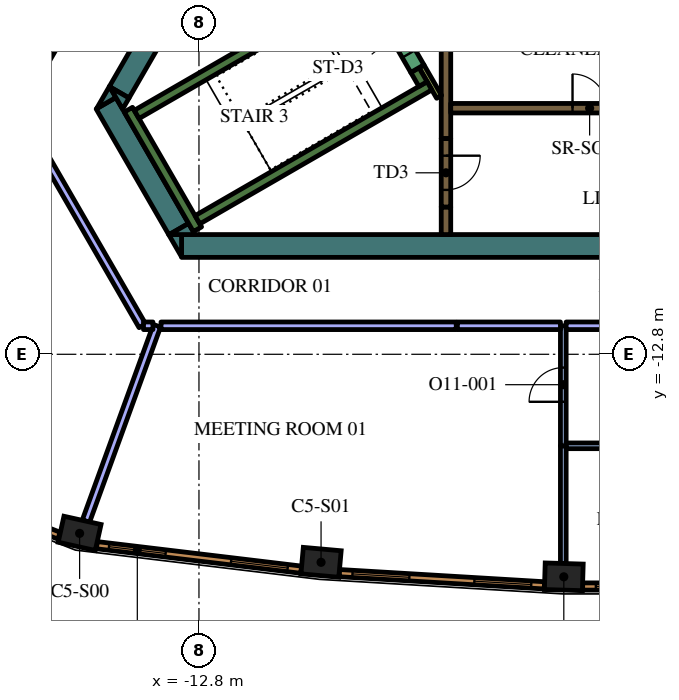
"""IFC4 building model, lengths in metres.
Left out: names, types, materials, properties, quantities, classifications, styles, units other than length and angle.
Written with IfcOpenShell. Run it as: python <this file> out.ifc"""

import sys

from ifc_helpers import new_model, si_unit, direction, frame, frame_2d, origin, origin_2d, place, context, subcontext, project, spatial, polyline, rectangle, outline, extrude, element, fill, save


model = new_model("IFC4")
c1 = context("Model", 3, precision=1e-05, world=origin(), true_north=direction((0.0, 1.0)))
c2 = subcontext(c1, "Body", "Model", "MODEL_VIEW")
j1 = project(units=[si_unit("LENGTHUNIT", "METRE"), si_unit("PLANEANGLEUNIT", "RADIAN")], contexts=[c1])
p1 = place(None, origin())
s1 = spatial("IfcSite", under=j1, at=p1, CompositionType="ELEMENT")
p2 = place(p1, origin())
s2 = spatial("IfcBuilding", under=s1, at=p2, CompositionType="ELEMENT")
p3 = place(p2, frame((0.0, 0.0, 271.2)))
s3 = spatial("IfcBuildingStorey", under=s2, at=p3, CompositionType="ELEMENT", Elevation=271.2)
for number, where, z_axis, x_axis in (
    (1, (-15.941, -17.512, 0.0), (0.0, 0.0, 1.0), (0.976, -0.217, 0.0)),
    (2, (-9.587, -18.274, 0.0), (0.0, 0.0, 1.0), (0.996, -0.089, 0.0)),
    (3, (-3.199, -18.655, 0.0), (0.0, 0.0, 1.0), (1.0, -0.03, 0.0)),
):
    element("IfcColumn", number, at=place(p3, frame(where, z_axis=z_axis, x_axis=x_axis)), inside=s3, PredefinedType="COLUMN", context=c2, shape_type="SweptSolid", body=[
        extrude(rectangle(XDim=1.0, YDim=0.7, at=origin_2d()), origin(), (0.0, 0.0, 1.0), 4.2),
    ])
p4 = place(p3, frame((8.904, -9.95, 0.0), z_axis=(0.0, 0.0, 1.0), x_axis=(-1.0, 0.0, 0.0)))
e4 = element("IfcWall", 4, at=p4, inside=s3, PredefinedType="SOLIDWALL", context=c2, shape_type="SweptSolid", body=[
    extrude(rectangle(XDim=22.161, YDim=0.6, at=frame_2d((11.081, 0.0))), origin(), (0.0, 0.0, 1.0), 4.2),
])
p5 = place(p3, origin())
e5 = element("IfcWall", 5, at=p5, inside=s3, PredefinedType="SOLIDWALL", context=c2, shape_type="SweptSolid", body=[
    extrude(outline(polyline([(-13.597, -9.65), (-13.259, -9.65), (-13.259, -10.236), (-13.597, -9.65)])), origin(), (0.0, 0.0, 1.0), 4.2),
])
p6 = place(p3, frame((-13.333, -9.506, 0.0), z_axis=(0.0, 0.0, 1.0), x_axis=(-0.500019073792, 0.866014391245, 0.0)))
e6 = element("IfcWall", 6, at=p6, inside=s3, PredefinedType="SOLIDWALL", context=c2, shape_type="SweptSolid", body=[
    extrude(rectangle(XDim=3.823, YDim=0.6, at=frame_2d((1.912, 0.0))), origin(), (0.0, 0.0, 1.0), 4.2),
])
e7 = element("IfcWall", 7, at=p5, inside=s3, PredefinedType="SOLIDWALL", context=c2, shape_type="SweptSolid", body=[
    extrude(outline(polyline([(-14.987, -6.043), (-15.493, -6.335), (-15.156, -5.75), (-14.987, -6.043)])), origin(), (0.0, 0.0, 1.0), 4.2),
])
e8 = element("IfcWall", 8, at=p5, inside=s3, PredefinedType="SOLIDWALL", context=c2, shape_type="SweptSolid", body=[
    extrude(outline(polyline([(-12.904, -9.65), (-13.58, -9.65), (-13.073, -9.357), (-12.904, -9.65)])), origin(), (0.0, 0.0, 1.0), 4.2),
])
p7 = place(p3, frame((-13.432, -3.364, 0.0), z_axis=(0.0, 0.0, 1.0), x_axis=(-0.499960127962, -0.866048422692, 0.0)))
e9 = element("IfcWall", 9, at=p7, inside=s3, PredefinedType="SOLIDWALL", context=c2, shape_type="SweptSolid", body=[
    extrude(rectangle(XDim=2.934, YDim=0.6, at=frame_2d((1.467, 0.0))), origin(), (0.0, 0.0, 1.0), 4.2),
])
e10 = element("IfcWall", 10, at=p5, inside=s3, PredefinedType="SOLIDWALL", context=c2, shape_type="SweptSolid", body=[
    extrude(outline(polyline([(-14.809, -6.35), (-15.147, -5.764), (-14.64, -6.057), (-14.809, -6.35)])), origin(), (0.0, 0.0, 1.0), 4.2),
])
p8 = place(p3, frame((-12.84, -9.511, 0.0), z_axis=(0.0, 0.0, 1.0), x_axis=(-0.499997733992, 0.866026712061, 0.0)))
e11 = element("IfcWall", 11, at=p8, inside=s3, PredefinedType="SOLIDWALL", context=c2, shape_type="SweptSolid", body=[
    extrude(rectangle(XDim=3.634, YDim=0.25, at=frame_2d((1.817, 0.0))), origin(), (0.0, 0.0, 1.0), 4.2),
])
p9 = place(p3, frame((-14.44, -6.49, 0.0), z_axis=(0.0, 0.0, 1.0), x_axis=(0.866022966069, 0.500004222222, 0.0)))
e12 = element("IfcWall", 12, at=p9, inside=s3, PredefinedType="SOLIDWALL", context=c2, shape_type="SweptSolid", body=[
    extrude(rectangle(XDim=6.8, YDim=0.25, at=frame_2d((3.4, 0.0))), origin(), (0.0, 0.0, 1.0), 4.2),
])
p10 = place(p3, frame((-12.84, -9.261, 0.0), z_axis=(0.0, 0.0, 1.0), x_axis=(0.866016039709, 0.500016218704, 0.0)))
e13 = element("IfcWall", 13, at=p10, inside=s3, PredefinedType="SOLIDWALL", context=c2, shape_type="SweptSolid", body=[
    extrude(rectangle(XDim=7.05, YDim=0.25, at=frame_2d((3.525, 0.0))), origin(), (0.0, 0.0, 1.0), 4.2),
])
p11 = place(p3, frame((-6.905, -5.69, 0.0), z_axis=(0.0, 0.0, 1.0), x_axis=(-0.500402024738, 0.865793170242, 0.0)))
e14 = element("IfcWall", 14, at=p11, inside=s3, PredefinedType="SOLIDWALL", context=c2, shape_type="SweptSolid", body=[
    extrude(rectangle(XDim=0.425, YDim=0.25, at=frame_2d((0.212, 0.0))), origin(), (0.0, 0.0, 1.0), 4.2),
])
p12 = place(p3, frame((-6.3, -7.125, 0.0), z_axis=(0.0, 0.0, 1.0), x_axis=(0.0, 1.0, 0.0)))
e15 = element("IfcWall", 15, at=p12, inside=s3, PredefinedType="SOLIDWALL", context=c2, shape_type="SweptSolid", body=[
    extrude(rectangle(XDim=3.375, YDim=0.25, at=frame_2d((1.687, 0.0))), origin(), (0.0, 0.0, 1.0), 4.2),
])
p13 = place(p3, frame((-6.3, -8.925, 0.0), z_axis=(0.0, 0.0, 1.0), x_axis=(0.0, -1.0, 0.0)))
e16 = element("IfcWall", 16, at=p13, inside=s3, PredefinedType="SOLIDWALL", context=c2, shape_type="SweptSolid", body=[
    extrude(rectangle(XDim=0.725, YDim=0.25, at=frame_2d((0.363, 0.0))), origin(), (0.0, 0.0, 1.0), 4.2),
])
p14 = place(p3, frame((-6.48, -6.027, 0.0), z_axis=(0.0, 0.0, 1.0), x_axis=(-0.499927229454, 0.866067413802, 0.0)))
e17 = element("IfcWall", 17, at=p14, inside=s3, PredefinedType="PARTITIONING", context=c2, shape_type="SweptSolid", body=[
    extrude(rectangle(XDim=0.929, YDim=0.15, at=frame_2d((0.464, 0.0))), origin(), (0.0, 0.0, 1.0), 4.2),
])
p15 = place(p3, frame((-6.175, -6.325, 0.0), z_axis=(0.0, 0.0, 1.0), x_axis=(1.0, 0.0, 0.0)))
e18 = element("IfcWall", 18, at=p15, inside=s3, PredefinedType="SOLIDWALL", context=c2, shape_type="SweptSolid", body=[
    extrude(rectangle(XDim=12.35, YDim=0.25, at=frame_2d((6.175, 0.0))), origin(), (0.0, 0.0, 1.0), 4.2),
])
p16 = place(p15, frame((3.205, 0.0, 0.0)))
e19 = element("IfcOpeningElement", 19, at=p16, cuts=e18, PredefinedType="OPENING", context=c2, shape_type="SweptSolid", body=[
    extrude(rectangle(XDim=0.9, YDim=2.1, at=frame_2d((0.45, 1.05))), frame((0.0, 0.135, 0.0), z_axis=(0.0, -1.0, 0.0), x_axis=(1.0, 0.0, 0.0)), (0.0, 0.0, 1.0), 0.27),
])
p17 = place(p15, frame((8.145, 0.0, 0.0)))
e20 = element("IfcOpeningElement", 20, at=p17, cuts=e18, PredefinedType="OPENING", context=c2, shape_type="SweptSolid", body=[
    extrude(rectangle(XDim=1.1, YDim=2.1, at=frame_2d((0.55, 1.05))), frame((0.0, 0.135, 0.0), z_axis=(0.0, -1.0, 0.0), x_axis=(1.0, 0.0, 0.0)), (0.0, 0.0, 1.0), 0.27),
])
p18 = place(p15, frame((10.665, 0.0, 0.0)))
e21 = element("IfcOpeningElement", 21, at=p18, cuts=e18, PredefinedType="OPENING", context=c2, shape_type="SweptSolid", body=[
    extrude(rectangle(XDim=1.1, YDim=2.1, at=frame_2d((0.55, 1.05))), frame((0.0, 0.135, 0.0), z_axis=(0.0, -1.0, 0.0), x_axis=(1.0, 0.0, 0.0)), (0.0, 0.0, 1.0), 0.27),
])
p19 = place(p3, frame((-8.103, -3.466, 0.0), z_axis=(0.0, 0.0, 1.0), x_axis=(0.500078061341, -0.865980330357, 0.0)))
e22 = element("IfcWall", 22, at=p19, inside=s3, PredefinedType="SOLIDWALL", context=c2, shape_type="SweptSolid", body=[
    extrude(rectangle(XDim=2.1, YDim=0.4, at=frame_2d((1.05, 0.0))), origin(), (0.0, 0.0, 1.0), 4.2),
])
p20 = place(p19, frame((0.45, 0.0, 0.0)))
e23 = element("IfcOpeningElement", 23, at=p20, cuts=e22, PredefinedType="OPENING", context=c2, shape_type="SweptSolid", body=[
    extrude(rectangle(XDim=1.2, YDim=2.1, at=frame_2d((0.6, 1.05))), frame((0.0, 0.21, 0.0), z_axis=(0.0, -1.0, 0.0), x_axis=(1.0, 0.0, 0.0)), (0.0, 0.0, 1.0), 0.42),
])
p21 = place(p3, frame((-6.3, -7.125, 0.0), z_axis=(0.0, 0.0, 1.0), x_axis=(0.0, -1.0, 0.0)))
e24 = element("IfcWall", 24, at=p21, inside=s3, PredefinedType="SOLIDWALL", context=c2, shape_type="SweptSolid", body=[
    extrude(rectangle(XDim=1.8, YDim=0.25, at=frame_2d((0.9, 0.0))), origin(), (0.0, 0.0, 1.0), 4.2),
])
p22 = place(p21, frame((0.45, 0.0, 0.0)))
e25 = element("IfcOpeningElement", 25, at=p22, cuts=e24, PredefinedType="OPENING", context=c2, shape_type="SweptSolid", body=[
    extrude(rectangle(XDim=0.9, YDim=2.1, at=frame_2d((0.45, 1.05))), frame((0.0, 0.135, 0.0), z_axis=(0.0, -1.0, 0.0), x_axis=(1.0, 0.0, 0.0)), (0.0, 0.0, 1.0), 0.27),
])
p23 = place(p3, frame((-3.213, -15.204, 0.0), z_axis=(0.0, 0.0, 1.0), x_axis=(0.0, -1.0, 0.0)))
e26 = element("IfcWall", 26, at=p23, inside=s3, PredefinedType="PARTITIONING", context=c2, shape_type="SweptSolid", body=[
    extrude(rectangle(XDim=3.1, YDim=0.15, at=frame_2d((1.55, 0.0))), origin(), (0.0, 0.0, 1.0), 3.55),
])
p24 = place(p3, frame((-3.213, -15.212, 0.0), z_axis=(0.0, 0.0, 1.0), x_axis=(0.0, 1.0, 0.0)))
e27 = element("IfcWall", 27, at=p24, inside=s3, PredefinedType="PARTITIONING", context=c2, shape_type="SweptSolid", body=[
    extrude(rectangle(XDim=3.162, YDim=0.15, at=frame_2d((1.581, 0.0))), origin(), (0.0, 0.0, 1.0), 3.55),
])
p25 = place(p24, frame((1.162, 0.0, 0.0)))
e28 = element("IfcOpeningElement", 28, at=p25, cuts=e27, PredefinedType="OPENING", context=c2, shape_type="SweptSolid", body=[
    extrude(rectangle(XDim=0.9, YDim=2.1, at=frame_2d((0.45, 1.05))), frame((0.0, 0.085, 0.0), z_axis=(0.0, -1.0, 0.0), x_axis=(1.0, 0.0, 0.0)), (0.0, 0.0, 1.0), 0.17),
])
p26 = place(p3, frame((-15.774, -17.19, 0.0), z_axis=(0.0, 0.0, 1.0), x_axis=(0.341821907823, 0.93976474893, 0.0)))
e29 = element("IfcWall", 29, at=p26, inside=s3, PredefinedType="PARTITIONING", context=c2, shape_type="SweptSolid", body=[
    extrude(rectangle(XDim=5.469, YDim=0.2, at=frame_2d((2.735, 0.0))), origin(), (0.0, 0.0, 1.0), 3.55),
])
p27 = place(p3, frame((-6.0, -12.05, 0.0), z_axis=(0.0, 0.0, 1.0), x_axis=(1.0, 0.0, 0.0)))
e30 = element("IfcWall", 30, at=p27, inside=s3, PredefinedType="PARTITIONING", context=c2, shape_type="SweptSolid", body=[
    extrude(rectangle(XDim=2.712, YDim=0.2, at=frame_2d((1.356, 0.0))), origin(), (0.0, 0.0, 1.0), 3.55),
])
p28 = place(p3, frame((-13.799, -12.05, 0.0), z_axis=(0.0, 0.0, 1.0), x_axis=(1.0, 0.0, 0.0)))
e31 = element("IfcWall", 31, at=p28, inside=s3, PredefinedType="PARTITIONING", context=c2, shape_type="SweptSolid", body=[
    extrude(rectangle(XDim=7.769, YDim=0.2, at=frame_2d((3.884, 0.0))), origin(), (0.0, 0.0, 1.0), 3.55),
])
p29 = place(p3, frame((3.138, -15.208, 0.0), z_axis=(0.0, 0.0, 1.0), x_axis=(-1.0, 0.0, 0.0)))
e32 = element("IfcWall", 32, at=p29, inside=s3, PredefinedType="PARTITIONING", context=c2, shape_type="SweptSolid", body=[
    extrude(rectangle(XDim=6.276, YDim=0.15, at=frame_2d((3.138, 0.0))), origin(), (0.0, 0.0, 1.0), 3.55),
])
p30 = place(p29, frame((2.676, 0.0, 0.0)))
e33 = element("IfcOpeningElement", 33, at=p30, cuts=e32, PredefinedType="OPENING", context=c2, shape_type="SweptSolid", body=[
    extrude(rectangle(XDim=0.9, YDim=2.1, at=frame_2d((0.45, 1.05))), frame((0.0, 0.085, 0.0), z_axis=(0.0, -1.0, 0.0), x_axis=(1.0, 0.0, 0.0)), (0.0, 0.0, 1.0), 0.17),
])
p31 = place(p3, frame((-3.138, -12.05, 0.0), z_axis=(0.0, 0.0, 1.0), x_axis=(1.0, 0.0, 0.0)))
e34 = element("IfcWall", 34, at=p31, inside=s3, PredefinedType="PARTITIONING", context=c2, shape_type="SweptSolid", body=[
    extrude(rectangle(XDim=9.138, YDim=0.2, at=frame_2d((4.569, 0.0))), origin(), (0.0, 0.0, 1.0), 3.55),
])
p32 = place(p3, frame((-13.451, 0.803, 0.0), z_axis=(0.0, 0.0, 1.0), x_axis=(-0.499982585408, -0.86603545787, 0.0)))
e35 = element("IfcWall", 35, at=p32, inside=s3, PredefinedType="PARTITIONING", context=c2, shape_type="SweptSolid", body=[
    extrude(rectangle(XDim=8.26, YDim=0.2, at=frame_2d((4.13, 0.0))), origin(), (0.0, 0.0, 1.0), 3.55),
])
p33 = place(p3, frame((-17.218, -6.978, 0.0), z_axis=(0.0, 0.0, 1.0), x_axis=(0.500012299885, -0.866018302326, 0.0)))
e36 = element("IfcWall", 36, at=p33, inside=s3, PredefinedType="PARTITIONING", context=c2, shape_type="SweptSolid", body=[
    extrude(rectangle(XDim=5.857, YDim=0.2, at=frame_2d((2.929, 0.0))), origin(), (0.0, 0.0, 1.0), 3.55),
])
p34 = place(p3, frame((-14.26, -12.05, 0.0), z_axis=(0.0, 0.0, 1.0), x_axis=(1.0, 0.0, 0.0)))
e37 = element("IfcWall", 37, at=p34, inside=s3, PredefinedType="PARTITIONING", context=c2, shape_type="SweptSolid", body=[
    extrude(rectangle(XDim=0.248, YDim=0.2, at=frame_2d((0.124, 0.0))), origin(), (0.0, 0.0, 1.0), 3.55),
])
p35 = place(p3, frame((-15.487, -17.823, 0.0), z_axis=(0.0, 0.0, 1.0), x_axis=(0.992885582795, -0.119072328769, 0.0)))
e38 = element("IfcWall", 38, at=p35, inside=s3, PredefinedType="SOLIDWALL", context=c2, shape_type="SweptSolid", body=[
    extrude(rectangle(XDim=5.415, YDim=0.19, at=frame_2d((2.708, 0.0))), origin(), (0.0, 0.0, 1.0), 3.95),
])
p36 = place(p35, frame((0.323, 0.0, 0.6)))
e39 = element("IfcOpeningElement", 39, at=p36, cuts=e38, PredefinedType="OPENING", context=c2, shape_type="SweptSolid", body=[
    extrude(rectangle(XDim=1.5, YDim=2.85, at=frame_2d((0.75, 1.425))), frame((0.0, 0.105, 0.0), z_axis=(0.0, -1.0, 0.0), x_axis=(1.0, 0.0, 0.0)), (0.0, 0.0, 1.0), 0.21),
])
p37 = place(p35, frame((3.558, 0.0, 0.6)))
e40 = element("IfcOpeningElement", 40, at=p37, cuts=e38, PredefinedType="OPENING", context=c2, shape_type="SweptSolid", body=[
    extrude(rectangle(XDim=1.5, YDim=2.85, at=frame_2d((0.75, 1.425))), frame((0.0, 0.105, 0.0), z_axis=(0.0, -1.0, 0.0), x_axis=(1.0, 0.0, 0.0)), (0.0, 0.0, 1.0), 0.21),
])
p38 = place(p3, frame((-9.107, -18.558, 0.0), z_axis=(0.0, 0.0, 1.0), x_axis=(0.998221492823, -0.059614186786, 0.0)))
e41 = element("IfcWall", 41, at=p38, inside=s3, PredefinedType="SOLIDWALL", context=c2, shape_type="SweptSolid", body=[
    extrude(rectangle(XDim=5.406, YDim=0.19, at=frame_2d((2.703, 0.0))), origin(), (0.0, 0.0, 1.0), 3.95),
])
p39 = place(p38, frame((0.346, 0.0, 0.6)))
e42 = element("IfcOpeningElement", 42, at=p39, cuts=e41, PredefinedType="OPENING", context=c2, shape_type="SweptSolid", body=[
    extrude(rectangle(XDim=1.5, YDim=2.85, at=frame_2d((0.75, 1.425))), frame((0.0, 0.105, 0.0), z_axis=(0.0, -1.0, 0.0), x_axis=(1.0, 0.0, 0.0)), (0.0, 0.0, 1.0), 0.21),
])
p40 = place(p38, frame((3.559, 0.0, 0.6)))
e43 = element("IfcOpeningElement", 43, at=p40, cuts=e41, PredefinedType="OPENING", context=c2, shape_type="SweptSolid", body=[
    extrude(rectangle(XDim=1.5, YDim=2.85, at=frame_2d((0.75, 1.425))), frame((0.0, 0.105, 0.0), z_axis=(0.0, -1.0, 0.0), x_axis=(1.0, 0.0, 0.0)), (0.0, 0.0, 1.0), 0.21),
])
p41 = place(p3, frame((-2.703, -18.91, 0.0), z_axis=(0.0, 0.0, 1.0), x_axis=(1.0, 0.0, 0.0)))
e44 = element("IfcWall", 44, at=p41, inside=s3, PredefinedType="SOLIDWALL", context=c2, shape_type="SweptSolid", body=[
    extrude(rectangle(XDim=5.406, YDim=0.19, at=frame_2d((2.703, 0.0))), origin(), (0.0, 0.0, 1.0), 3.95),
])
p42 = place(p41, frame((0.346, 0.0, 0.6)))
e45 = element("IfcOpeningElement", 45, at=p42, cuts=e44, PredefinedType="OPENING", context=c2, shape_type="SweptSolid", body=[
    extrude(rectangle(XDim=1.5, YDim=2.85, at=frame_2d((0.75, 1.425))), frame((0.0, 0.105, 0.0), z_axis=(0.0, -1.0, 0.0), x_axis=(1.0, 0.0, 0.0)), (0.0, 0.0, 1.0), 0.21),
])
p43 = place(p41, frame((3.56, 0.0, 0.6)))
e46 = element("IfcOpeningElement", 46, at=p43, cuts=e44, PredefinedType="OPENING", context=c2, shape_type="SweptSolid", body=[
    extrude(rectangle(XDim=1.5, YDim=2.85, at=frame_2d((0.75, 1.425))), frame((0.0, 0.105, 0.0), z_axis=(0.0, -1.0, 0.0), x_axis=(1.0, 0.0, 0.0)), (0.0, 0.0, 1.0), 0.21),
])
p44 = place(p3, frame((-19.496, -16.392, 0.0), z_axis=(0.0, 0.0, 1.0), x_axis=(0.93100888477, -0.364996515709, 0.0)))
e47 = element("IfcWall", 47, at=p44, inside=s3, PredefinedType="SOLIDWALL", context=c2, shape_type="SweptSolid", body=[
    extrude(rectangle(XDim=3.237, YDim=0.19, at=frame_2d((1.618, 0.0))), origin(), (0.0, 0.0, 1.0), 3.95),
])
p45 = place(p44, frame((1.068, 0.0, 0.6)))
e48 = element("IfcOpeningElement", 48, at=p45, cuts=e47, PredefinedType="OPENING", context=c2, shape_type="SweptSolid", body=[
    extrude(rectangle(XDim=1.1, YDim=2.85, at=frame_2d((0.55, 1.425))), frame((0.0, 0.105, 0.0), z_axis=(0.0, -1.0, 0.0), x_axis=(1.0, 0.0, 0.0)), (0.0, 0.0, 1.0), 0.21),
])
p46 = place(p16, origin())
e49 = element("IfcDoor", 49, at=p46, inside=s3, OperationType="SINGLE_SWING_LEFT", PredefinedType="DOOR", context=c2, shape_type="SweptSolid", body=[
    extrude(rectangle(XDim=0.9, YDim=2.1, at=frame_2d((0.45, 1.05))), frame((0.0, 0.025, 0.0), z_axis=(0.0, -1.0, 0.0), x_axis=(1.0, 0.0, 0.0)), (0.0, 0.0, 1.0), 0.05),
])
fill(e19, e49)
p47 = place(p20, origin())
e50 = element("IfcDoor", 50, at=p47, inside=s3, OperationType="SINGLE_SWING_LEFT", PredefinedType="DOOR", context=c2, shape_type="SweptSolid", body=[
    extrude(rectangle(XDim=1.2, YDim=2.1, at=frame_2d((0.6, 1.05))), frame((0.0, 0.025, 0.0), z_axis=(0.0, -1.0, 0.0), x_axis=(1.0, 0.0, 0.0)), (0.0, 0.0, 1.0), 0.05),
])
fill(e23, e50)
p48 = place(p22, origin())
e51 = element("IfcDoor", 51, at=p48, inside=s3, OperationType="SINGLE_SWING_LEFT", PredefinedType="DOOR", context=c2, shape_type="SweptSolid", body=[
    extrude(rectangle(XDim=0.9, YDim=2.1, at=frame_2d((0.45, 1.05))), frame((0.0, 0.025, 0.0), z_axis=(0.0, -1.0, 0.0), x_axis=(1.0, 0.0, 0.0)), (0.0, 0.0, 1.0), 0.05),
])
fill(e25, e51)
p49 = place(p25, origin())
e52 = element("IfcDoor", 52, at=p49, inside=s3, OperationType="SINGLE_SWING_RIGHT", PredefinedType="DOOR", context=c2, shape_type="SweptSolid", body=[
    extrude(rectangle(XDim=0.9, YDim=2.1, at=frame_2d((0.45, 1.05))), frame((0.0, 0.025, 0.0), z_axis=(0.0, -1.0, 0.0), x_axis=(1.0, 0.0, 0.0)), (0.0, 0.0, 1.0), 0.05),
])
fill(e28, e52)
p50 = place(p36, origin())
e53 = element("IfcWindow", 53, at=p50, inside=s3, PartitioningType="SINGLE_PANEL", PredefinedType="WINDOW", context=c2, shape_type="SweptSolid", body=[
    extrude(rectangle(XDim=1.5, YDim=2.85, at=frame_2d((0.75, 1.425))), frame((0.0, 0.045, 0.0), z_axis=(0.0, -1.0, 0.0), x_axis=(1.0, 0.0, 0.0)), (0.0, 0.0, 1.0), 0.06),
])
fill(e39, e53)
p51 = place(p37, origin())
e54 = element("IfcWindow", 54, at=p51, inside=s3, PartitioningType="SINGLE_PANEL", PredefinedType="WINDOW", context=c2, shape_type="SweptSolid", body=[
    extrude(rectangle(XDim=1.5, YDim=2.85, at=frame_2d((0.75, 1.425))), frame((0.0, 0.045, 0.0), z_axis=(0.0, -1.0, 0.0), x_axis=(1.0, 0.0, 0.0)), (0.0, 0.0, 1.0), 0.06),
])
fill(e40, e54)
p52 = place(p39, origin())
e55 = element("IfcWindow", 55, at=p52, inside=s3, PartitioningType="SINGLE_PANEL", PredefinedType="WINDOW", context=c2, shape_type="SweptSolid", body=[
    extrude(rectangle(XDim=1.5, YDim=2.85, at=frame_2d((0.75, 1.425))), frame((0.0, 0.045, 0.0), z_axis=(0.0, -1.0, 0.0), x_axis=(1.0, 0.0, 0.0)), (0.0, 0.0, 1.0), 0.06),
])
fill(e42, e55)
p53 = place(p40, origin())
e56 = element("IfcWindow", 56, at=p53, inside=s3, PartitioningType="SINGLE_PANEL", PredefinedType="WINDOW", context=c2, shape_type="SweptSolid", body=[
    extrude(rectangle(XDim=1.5, YDim=2.85, at=frame_2d((0.75, 1.425))), frame((0.0, 0.045, 0.0), z_axis=(0.0, -1.0, 0.0), x_axis=(1.0, 0.0, 0.0)), (0.0, 0.0, 1.0), 0.06),
])
fill(e43, e56)
p54 = place(p42, origin())
e57 = element("IfcWindow", 57, at=p54, inside=s3, PartitioningType="SINGLE_PANEL", PredefinedType="WINDOW", context=c2, shape_type="SweptSolid", body=[
    extrude(rectangle(XDim=1.5, YDim=2.85, at=frame_2d((0.75, 1.425))), frame((0.0, 0.045, 0.0), z_axis=(0.0, -1.0, 0.0), x_axis=(1.0, 0.0, 0.0)), (0.0, 0.0, 1.0), 0.06),
])
fill(e45, e57)
save(model, sys.argv[1])
